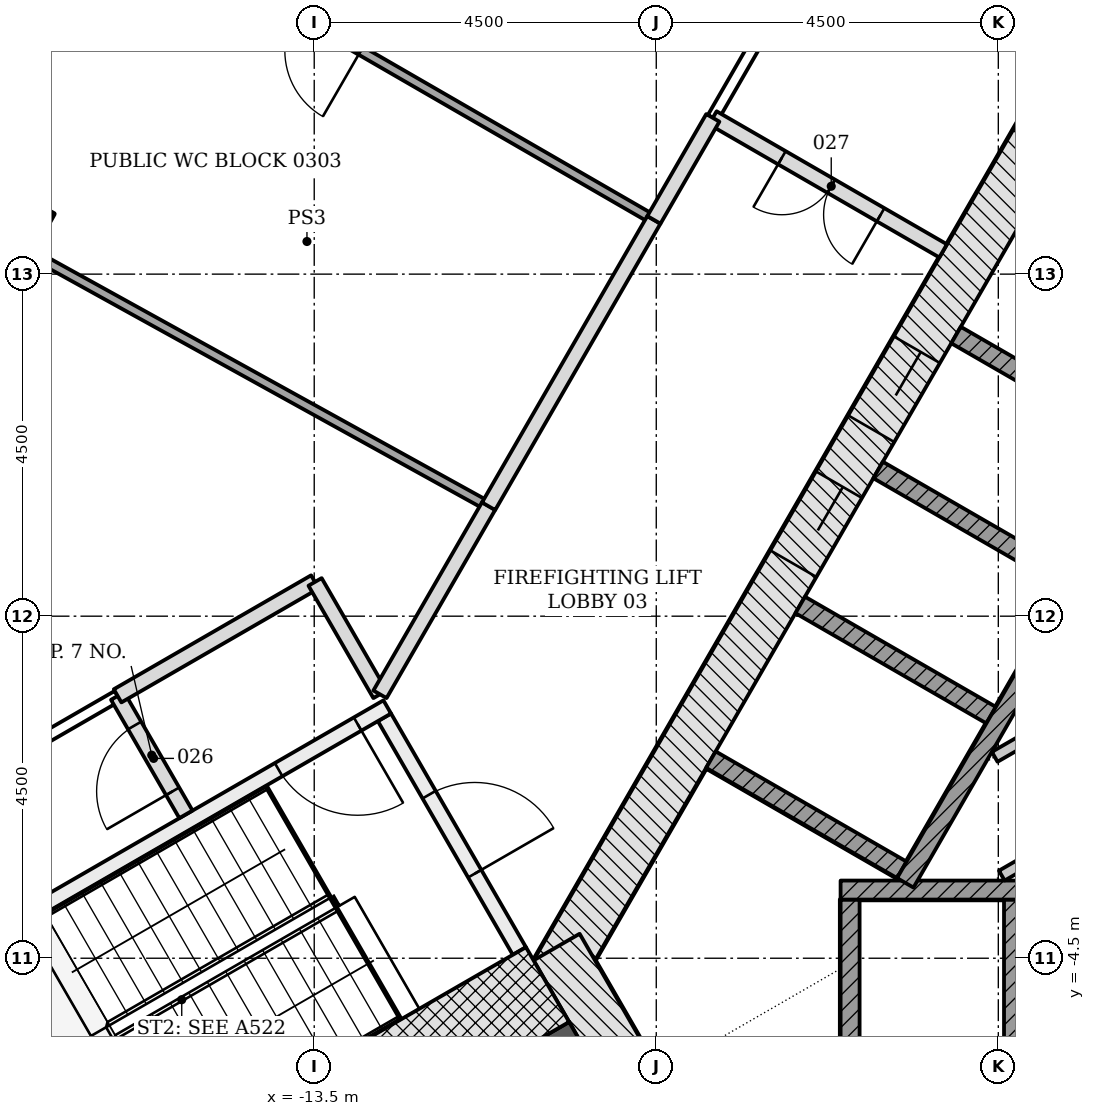
"""IFC4 building model, lengths in metres.
Left out: names, types, materials, properties, quantities, classifications, styles, units other than length and angle.
Written with IfcOpenShell. Run it as: python <this file> out.ifc"""

import sys

from ifc_helpers import new_model, si_unit, direction, frame, frame_2d, origin, origin_2d, place, context, subcontext, project, spatial, polyline, rectangle, outline, extrude, element, fill, save


model = new_model("IFC4")
c1 = context("Model", 3, precision=1e-05, world=origin(), true_north=direction((0.0, 1.0)))
c2 = subcontext(c1, "Body", "Model", "MODEL_VIEW")
j1 = project(units=[si_unit("LENGTHUNIT", "METRE"), si_unit("PLANEANGLEUNIT", "RADIAN")], contexts=[c1])
p1 = place(None, origin())
s1 = spatial("IfcSite", under=j1, at=p1, CompositionType="ELEMENT")
p2 = place(p1, origin())
s2 = spatial("IfcBuilding", under=s1, at=p2, CompositionType="ELEMENT")
p3 = place(p2, frame((0.0, 0.0, 15.0)))
s3 = spatial("IfcBuildingStorey", under=s2, at=p3, CompositionType="ELEMENT", Elevation=15.0)
p4 = place(p3, frame((-17.739, 5.058, -0.25), z_axis=(0.0, 0.0, 1.0), x_axis=(-0.875152760281, 0.483846717641, 0.0)))
e1 = element("IfcColumn", 1, at=p4, inside=s3, PredefinedType="COLUMN", context=c2, shape_type="SweptSolid", body=[
    extrude(rectangle(XDim=1.2, YDim=1.2, at=origin_2d()), origin(), (0.0, 0.0, 1.0), 4.5),
])
p5 = place(p3, frame((-1.083, 11.281, -0.25), z_axis=(0.0, 0.0, 1.0), x_axis=(-0.500001446645, -0.866024568562, 0.0)))
e2 = element("IfcWall", 2, at=p5, inside=s3, PredefinedType="SHEAR", context=c2, shape_type="SweptSolid", body=[
    extrude(rectangle(XDim=18.458, YDim=0.7, at=frame_2d((9.229, 0.0))), origin(), (0.0, 0.0, 1.0), 4.5),
])
p6 = place(p5, frame((8.979, 0.0, 0.25)))
e3 = element("IfcOpeningElement", 3, at=p6, cuts=e2, PredefinedType="OPENING", context=c2, shape_type="SweptSolid", body=[
    extrude(rectangle(XDim=1.2, YDim=2.1, at=frame_2d((0.6, 1.05))), frame((0.0, 0.36, 0.0), z_axis=(0.0, -1.0, 0.0), x_axis=(1.0, 0.0, 0.0)), (0.0, 0.0, 1.0), 0.72),
])
p7 = place(p5, frame((11.029, 0.0, 0.25)))
e4 = element("IfcOpeningElement", 4, at=p7, cuts=e2, PredefinedType="OPENING", context=c2, shape_type="SweptSolid", body=[
    extrude(rectangle(XDim=1.2, YDim=2.1, at=frame_2d((0.6, 1.05))), frame((0.0, 0.36, 0.0), z_axis=(0.0, -1.0, 0.0), x_axis=(1.0, 0.0, 0.0)), (0.0, 0.0, 1.0), 0.72),
])
p8 = place(p3, frame((-10.311, -4.353, -0.25), z_axis=(0.0, 0.0, 1.0), x_axis=(0.500042739161, -0.866000726912, 0.0)))
e5 = element("IfcWall", 5, at=p8, inside=s3, PredefinedType="SHEAR", context=c2, shape_type="SweptSolid", body=[
    extrude(rectangle(XDim=2.771, YDim=0.7, at=frame_2d((1.386, 0.0))), origin(), (0.0, 0.0, 1.0), 4.5),
])
p9 = place(p3, frame((-9.922, -5.728, -0.25), z_axis=(0.0, 0.0, 1.0), x_axis=(-0.866028046028, -0.499995423472, 0.0)))
e6 = element("IfcWall", 6, at=p9, inside=s3, PredefinedType="SHEAR", context=c2, shape_type="SweptSolid", body=[
    extrude(rectangle(XDim=14.633, YDim=0.9, at=frame_2d((7.316, 0.0))), origin(), (0.0, 0.0, 1.0), 4.5),
])
p10 = place(p9, frame((7.35, 0.0, 0.25)))
e7 = element("IfcOpeningElement", 7, at=p10, cuts=e6, PredefinedType="OPENING", context=c2, shape_type="SweptSolid", body=[
    extrude(rectangle(XDim=1.5, YDim=2.1, at=frame_2d((0.75, 1.05))), frame((0.0, 0.46, 0.0), z_axis=(0.0, -1.0, 0.0), x_axis=(1.0, 0.0, 0.0)), (0.0, 0.0, 1.0), 0.92),
])
for number, where, z_axis, x_axis in (
    (8, (-6.45, -6.228, -0.25), (0.0, 0.0, 1.0), (0.0, 1.0, 0.0)),
    (9, (-4.3, -6.228, -0.25), (0.0, 0.0, 1.0), (0.0, 1.0, 0.0)),
):
    element("IfcWall", number, at=place(p3, frame(where, z_axis=z_axis, x_axis=x_axis)), inside=s3, PredefinedType="PARTITIONING", context=c2, shape_type="SweptSolid", body=[
        extrude(rectangle(XDim=2.5, YDim=0.25, at=frame_2d((1.25, 0.0))), origin(), (0.0, 0.0, 1.0), 4.5),
    ])
p11 = place(p3, frame((-6.575, -3.603, 0.0), z_axis=(0.0, 0.0, 1.0), x_axis=(1.0, 0.0, 0.0)))
e10 = element("IfcWall", 10, at=p11, inside=s3, PredefinedType="PARTITIONING", context=c2, shape_type="SweptSolid", body=[
    extrude(rectangle(XDim=13.15, YDim=0.25, at=frame_2d((6.575, 0.0))), origin(), (0.0, 0.0, 1.0), 4.25),
])
for number, where, z_axis, x_axis in (
    (11, (-5.056, 3.699, -0.25), (0.0, 0.0, 1.0), (0.866, -0.5, 0.0)),
    (12, (-6.081, 1.923, -0.25), (0.0, 0.0, 1.0), (0.866, -0.5, 0.0)),
    (13, (-7.106, 0.148, -0.25), (0.0, 0.0, 1.0), (0.866, -0.5, 0.0)),
    (14, (-8.281, -1.887, -0.25), (0.0, 0.0, 1.0), (0.866, -0.5, 0.0)),
):
    element("IfcWall", number, at=place(p3, frame(where, z_axis=z_axis, x_axis=x_axis)), inside=s3, PredefinedType="PARTITIONING", context=c2, shape_type="SweptSolid", body=[
        extrude(rectangle(XDim=2.9, YDim=0.25, at=frame_2d((1.45, 0.0))), origin(), (0.0, 0.0, 1.0), 4.5),
    ])
p12 = place(p3, frame((0.176, 6.711, 0.0), z_axis=(0.0, 0.0, 1.0), x_axis=(-0.500004227369, -0.866022963098, 0.0)))
e15 = element("IfcWall", 15, at=p12, inside=s3, PredefinedType="PARTITIONING", context=c2, shape_type="SweptSolid", body=[
    extrude(rectangle(XDim=11.8, YDim=0.25, at=frame_2d((5.9, 0.0))), origin(), (0.0, 0.0, 1.0), 4.25),
])
p13 = place(p3, frame((-4.548, -1.851, 0.0), z_axis=(0.0, 0.0, 1.0), x_axis=(0.866023939251, 0.500002536638, 0.0)))
e16 = element("IfcWall", 16, at=p13, inside=s3, PredefinedType="PARTITIONING", context=c2, shape_type="SweptSolid", body=[
    extrude(rectangle(XDim=11.092, YDim=0.15, at=frame_2d((5.546, 0.0))), origin(), (0.0, 0.0, 1.0), 4.25),
])
p14 = place(p13, frame((3.497, 0.0, 0.0)))
e17 = element("IfcOpeningElement", 17, at=p14, cuts=e16, PredefinedType="OPENING", context=c2, shape_type="SweptSolid", body=[
    extrude(rectangle(XDim=0.9, YDim=2.1, at=frame_2d((0.45, 1.05))), frame((0.0, 0.085, 0.0), z_axis=(0.0, -1.0, 0.0), x_axis=(1.0, 0.0, 0.0)), (0.0, 0.0, 1.0), 0.17),
])
p15 = place(p3, frame((-4.454, -3.413, 0.0), z_axis=(0.0, 0.0, 1.0), x_axis=(0.86603043987, 0.499991277142, 0.0)))
e18 = element("IfcWall", 18, at=p15, inside=s3, PredefinedType="PARTITIONING", context=c2, shape_type="SweptSolid", body=[
    extrude(rectangle(XDim=11.792, YDim=0.15, at=frame_2d((5.896, 0.0))), origin(), (0.0, 0.0, 1.0), 4.25),
])
p16 = place(p15, frame((3.847, 0.0, 0.0)))
e19 = element("IfcOpeningElement", 19, at=p16, cuts=e18, PredefinedType="OPENING", context=c2, shape_type="SweptSolid", body=[
    extrude(rectangle(XDim=0.9, YDim=2.1, at=frame_2d((0.45, 1.05))), frame((0.0, 0.085, 0.0), z_axis=(0.0, -1.0, 0.0), x_axis=(1.0, 0.0, 0.0)), (0.0, 0.0, 1.0), 0.17),
])
p17 = place(p3, frame((-12.576, -1.331, -0.25), z_axis=(0.0, 0.0, 1.0), x_axis=(0.499970499736, -0.8660424351, 0.0)))
e20 = element("IfcWall", 20, at=p17, inside=s3, PredefinedType="SHEAR", context=c2, shape_type="SweptSolid", body=[
    extrude(rectangle(XDim=3.55, YDim=0.2, at=frame_2d((1.775, 0.0))), origin(), (0.0, 0.0, 1.0), 4.5),
])
p18 = place(p17, frame((1.175, 0.0, 0.25)))
e21 = element("IfcOpeningElement", 21, at=p18, cuts=e20, PredefinedType="OPENING", context=c2, shape_type="SweptSolid", body=[
    extrude(rectangle(XDim=1.2, YDim=2.1, at=frame_2d((0.6, 1.05))), frame((0.0, 0.11, 0.0), z_axis=(0.0, -1.0, 0.0), x_axis=(1.0, 0.0, 0.0)), (0.0, 0.0, 1.0), 0.22),
])
p19 = place(p3, frame((-12.539, -1.194, -0.25), z_axis=(0.0, 0.0, 1.0), x_axis=(-0.866045472092, -0.499965239061, 0.0)))
e22 = element("IfcWall", 22, at=p19, inside=s3, PredefinedType="SHEAR", context=c2, shape_type="SweptSolid", body=[
    extrude(rectangle(XDim=5.6, YDim=0.2, at=frame_2d((2.8, 0.0))), origin(), (0.0, 0.0, 1.0), 4.5),
])
p20 = place(p19, frame((0.45, 0.0, 0.25)))
e23 = element("IfcOpeningElement", 23, at=p20, cuts=e22, PredefinedType="OPENING", context=c2, shape_type="SweptSolid", body=[
    extrude(rectangle(XDim=1.2, YDim=2.1, at=frame_2d((0.6, 1.05))), frame((0.0, 0.11, 0.0), z_axis=(0.0, -1.0, 0.0), x_axis=(1.0, 0.0, 0.0)), (0.0, 0.0, 1.0), 0.22),
])
p21 = place(p3, frame((-10.43, -4.847, -0.25), z_axis=(0.0, 0.0, 1.0), x_axis=(-0.866018442252, -0.500012057535, 0.0)))
e24 = element("IfcWall", 24, at=p21, inside=s3, PredefinedType="SHEAR", context=c2, shape_type="SweptSolid", body=[
    extrude(rectangle(XDim=7.2, YDim=1.136, at=frame_2d((3.6, 0.0))), origin(), (0.0, 0.0, 1.0), 4.5),
])
p22 = place(p3, frame((0.0, 0.0, -0.25)))
e25 = element("IfcWall", 25, at=p22, inside=s3, PredefinedType="SHEAR", context=c2, shape_type="SweptSolid", body=[
    extrude(outline(polyline([(-17.439, -3.907), (-18.025, -6.093), (-16.95, -7.955), (-16.777, -7.855), (-17.81, -6.065), (-17.267, -4.039), (-17.339, -4.081), (-17.339, -4.081), (-17.339, -4.081), (-17.339, -4.081), (-17.339, -4.081), (-17.339, -4.081), (-17.339, -4.081), (-17.339, -4.081), (-17.339, -4.081), (-17.339, -4.081), (-17.339, -4.081), (-17.339, -4.081), (-17.339, -4.081), (-17.339, -4.081), (-17.339, -4.081), (-17.339, -4.081), (-17.339, -4.081), (-17.439, -3.907)])), origin(), (0.0, 0.0, 1.0), 4.5),
])
p23 = place(p3, frame((-16.088, -1.049, 0.0), z_axis=(0.0, 0.0, 1.0), x_axis=(-0.866023883975, -0.500002632377, 0.0)))
e26 = element("IfcWall", 26, at=p23, inside=s3, PredefinedType="PARTITIONING", context=c2, shape_type="SweptSolid", body=[
    extrude(rectangle(XDim=5.104, YDim=0.15, at=frame_2d((2.552, 0.0))), origin(), (0.0, 0.0, 1.0), 3.638),
])
p24 = place(p23, frame((1.65, 0.0, 0.0)))
e27 = element("IfcOpeningElement", 27, at=p24, cuts=e26, PredefinedType="OPENING", context=c2, shape_type="SweptSolid", body=[
    extrude(rectangle(XDim=1.8, YDim=2.1, at=frame_2d((0.9, 1.05))), frame((0.0, 0.085, 0.0), z_axis=(0.0, -1.0, 0.0), x_axis=(1.0, 0.0, 0.0)), (0.0, 0.0, 1.0), 0.17),
])
p25 = place(p3, frame((-15.188, -2.607, 0.0), z_axis=(0.0, 0.0, 1.0), x_axis=(-0.500024172624, 0.866011447264, 0.0)))
e28 = element("IfcWall", 28, at=p25, inside=s3, PredefinedType="PARTITIONING", context=c2, shape_type="SweptSolid", body=[
    extrude(rectangle(XDim=1.798, YDim=0.2, at=frame_2d((0.899, 0.0))), origin(), (0.0, 0.0, 1.0), 3.638),
])
p26 = place(p25, frame((0.35, 0.0, 0.0)))
e29 = element("IfcOpeningElement", 29, at=p26, cuts=e28, PredefinedType="OPENING", context=c2, shape_type="SweptSolid", body=[
    extrude(rectangle(XDim=1.0, YDim=2.1, at=frame_2d((0.5, 1.05))), frame((0.0, 0.11, 0.0), z_axis=(0.0, -1.0, 0.0), x_axis=(1.0, 0.0, 0.0)), (0.0, 0.0, 1.0), 0.22),
])
p27 = place(p3, frame((-16.087, -1.048, 0.0), z_axis=(0.0, 0.0, 1.0), x_axis=(0.865988915629, 0.500063194015, 0.0)))
e30 = element("IfcWall", 30, at=p27, inside=s3, PredefinedType="PARTITIONING", context=c2, shape_type="SweptSolid", body=[
    extrude(rectangle(XDim=2.998, YDim=0.2, at=frame_2d((1.499, 0.0))), origin(), (0.0, 0.0, 1.0), 3.638),
])
p28 = place(p3, frame((-13.489, 0.451, 0.0), z_axis=(0.0, 0.0, 1.0), x_axis=(0.500044178772, -0.865999895656, 0.0)))
e31 = element("IfcWall", 31, at=p28, inside=s3, PredefinedType="PARTITIONING", context=c2, shape_type="SweptSolid", body=[
    extrude(rectangle(XDim=1.708, YDim=0.2, at=frame_2d((0.854, 0.0))), origin(), (0.0, 0.0, 1.0), 4.25),
])
p29 = place(p3, frame((-12.635, -1.028, 0.0), z_axis=(0.0, 0.0, 1.0), x_axis=(0.499801250411, 0.866140121509, 0.0)))
e32 = element("IfcWall", 32, at=p29, inside=s3, PredefinedType="PARTITIONING", context=c2, shape_type="SweptSolid", body=[
    extrude(rectangle(XDim=2.861, YDim=0.2, at=frame_2d((1.431, 0.0))), origin(), (0.0, 0.0, 1.0), 3.638),
])
p30 = place(p3, frame((-11.208, 1.446, 0.0), z_axis=(0.0, 0.0, 1.0), x_axis=(-0.875125393946, 0.483896212912, 0.0)))
e33 = element("IfcWall", 33, at=p30, inside=s3, PredefinedType="PARTITIONING", context=c2, shape_type="SweptSolid", body=[
    extrude(rectangle(XDim=6.863, YDim=0.12, at=frame_2d((3.432, 0.0))), origin(), (0.0, 0.0, 1.0), 3.638),
])
p31 = place(p3, frame((-9.032, 5.213, 0.0), z_axis=(0.0, 0.0, 1.0), x_axis=(-0.499876332206, -0.866096791646, 0.0)))
e34 = element("IfcWall", 34, at=p31, inside=s3, PredefinedType="PARTITIONING", context=c2, shape_type="SweptSolid", body=[
    extrude(rectangle(XDim=4.349, YDim=0.2, at=frame_2d((2.175, 0.0))), origin(), (0.0, 0.0, 1.0), 3.638),
])
p32 = place(p3, frame((-5.226, 4.806, 0.0), z_axis=(0.0, 0.0, 1.0), x_axis=(-0.865949687125, 0.500131122175, 0.0)))
e35 = element("IfcWall", 35, at=p32, inside=s3, PredefinedType="PARTITIONING", context=c2, shape_type="SweptSolid", body=[
    extrude(rectangle(XDim=3.499, YDim=0.2, at=frame_2d((1.75, 0.0))), origin(), (0.0, 0.0, 1.0), 4.25),
])
p33 = place(p32, frame((0.95, 0.0, 0.0)))
e36 = element("IfcOpeningElement", 36, at=p33, cuts=e35, PredefinedType="OPENING", context=c2, shape_type="SweptSolid", body=[
    extrude(rectangle(XDim=1.5, YDim=2.1, at=frame_2d((0.75, 1.05))), frame((0.0, 0.11, 0.0), z_axis=(0.0, -1.0, 0.0), x_axis=(1.0, 0.0, 0.0)), (0.0, 0.0, 1.0), 0.22),
])
p34 = place(p3, frame((-8.256, 6.556, 0.0), z_axis=(0.0, 0.0, 1.0), x_axis=(-0.500104332946, -0.86596515875, 0.0)))
e37 = element("IfcWall", 37, at=p34, inside=s3, PredefinedType="PARTITIONING", context=c2, shape_type="SweptSolid", body=[
    extrude(rectangle(XDim=1.55, YDim=0.2, at=frame_2d((0.775, 0.0))), origin(), (0.0, 0.0, 1.0), 3.638),
])
p35 = place(p3, frame((-9.033, 5.214, 0.0), z_axis=(0.0, 0.0, 1.0), x_axis=(-0.866000641544, 0.500042887006, 0.0)))
e38 = element("IfcWall", 38, at=p35, inside=s3, PredefinedType="PARTITIONING", context=c2, shape_type="SweptSolid", body=[
    extrude(rectangle(XDim=9.827, YDim=0.12, at=frame_2d((4.914, 0.0))), origin(), (0.0, 0.0, 1.0), 3.638),
])
p36 = place(p35, frame((4.45, 0.0, 0.0)))
e39 = element("IfcOpeningElement", 39, at=p36, cuts=e38, PredefinedType="OPENING", context=c2, shape_type="SweptSolid", body=[
    extrude(rectangle(XDim=1.0, YDim=2.1, at=frame_2d((0.5, 1.05))), frame((0.0, 0.07, 0.0), z_axis=(0.0, -1.0, 0.0), x_axis=(1.0, 0.0, 0.0)), (0.0, 0.0, 1.0), 0.14),
])
p37 = place(p3, frame((-3.406, 14.956, 0.0), z_axis=(0.0, 0.0, 1.0), x_axis=(-0.500020940175, -0.866013313631, 0.0)))
e40 = element("IfcWall", 40, at=p37, inside=s3, PredefinedType="PARTITIONING", context=c2, shape_type="SweptSolid", body=[
    extrude(rectangle(XDim=9.7, YDim=0.15, at=frame_2d((4.85, 0.0))), origin(), (0.0, 0.0, 1.0), 3.638),
])
p38 = place(p37, frame((3.95, 0.0, 0.0)))
e41 = element("IfcOpeningElement", 41, at=p38, cuts=e40, PredefinedType="OPENING", context=c2, shape_type="SweptSolid", body=[
    extrude(rectangle(XDim=1.8, YDim=2.1, at=frame_2d((0.9, 1.05))), frame((0.0, 0.085, 0.0), z_axis=(0.0, -1.0, 0.0), x_axis=(1.0, 0.0, 0.0)), (0.0, 0.0, 1.0), 0.17),
])
p39 = place(p6, origin())
e42 = element("IfcDoor", 42, at=p39, inside=s3, OperationType="DOUBLE_DOOR_SLIDING", PredefinedType="DOOR", context=c2, shape_type="SweptSolid", body=[
    extrude(rectangle(XDim=1.2, YDim=2.1, at=frame_2d((0.6, 1.05))), frame((0.0, 0.025, 0.0), z_axis=(0.0, -1.0, 0.0), x_axis=(1.0, 0.0, 0.0)), (0.0, 0.0, 1.0), 0.05),
])
fill(e3, e42)
p40 = place(p7, origin())
e43 = element("IfcDoor", 43, at=p40, inside=s3, OperationType="DOUBLE_DOOR_SLIDING", PredefinedType="DOOR", context=c2, shape_type="SweptSolid", body=[
    extrude(rectangle(XDim=1.2, YDim=2.1, at=frame_2d((0.6, 1.05))), frame((0.0, 0.025, 0.0), z_axis=(0.0, -1.0, 0.0), x_axis=(1.0, 0.0, 0.0)), (0.0, 0.0, 1.0), 0.05),
])
fill(e4, e43)
p41 = place(p18, origin())
e44 = element("IfcDoor", 44, at=p41, inside=s3, OperationType="SINGLE_SWING_RIGHT", PredefinedType="DOOR", context=c2, shape_type="SweptSolid", body=[
    extrude(rectangle(XDim=1.2, YDim=2.1, at=frame_2d((0.6, 1.05))), frame((0.0, 0.025, 0.0), z_axis=(0.0, -1.0, 0.0), x_axis=(1.0, 0.0, 0.0)), (0.0, 0.0, 1.0), 0.05),
])
fill(e21, e44)
p42 = place(p20, origin())
e45 = element("IfcDoor", 45, at=p42, inside=s3, OperationType="SINGLE_SWING_LEFT", PredefinedType="DOOR", context=c2, shape_type="SweptSolid", body=[
    extrude(rectangle(XDim=1.2, YDim=2.1, at=frame_2d((0.6, 1.05))), frame((0.0, 0.025, 0.0), z_axis=(0.0, -1.0, 0.0), x_axis=(1.0, 0.0, 0.0)), (0.0, 0.0, 1.0), 0.05),
])
fill(e23, e45)
p43 = place(p36, origin())
e46 = element("IfcDoor", 46, at=p43, inside=s3, OperationType="SINGLE_SWING_RIGHT", PredefinedType="DOOR", context=c2, shape_type="SweptSolid", body=[
    extrude(rectangle(XDim=1.0, YDim=2.1, at=frame_2d((0.5, 1.05))), frame((0.0, 0.025, 0.0), z_axis=(0.0, -1.0, 0.0), x_axis=(1.0, 0.0, 0.0)), (0.0, 0.0, 1.0), 0.05),
])
fill(e39, e46)
p44 = place(p26, origin())
e47 = element("IfcDoor", 47, at=p44, inside=s3, OperationType="SINGLE_SWING_LEFT", PredefinedType="DOOR", context=c2, shape_type="SweptSolid", body=[
    extrude(rectangle(XDim=1.0, YDim=2.1, at=frame_2d((0.5, 1.05))), frame((0.0, 0.025, 0.0), z_axis=(0.0, -1.0, 0.0), x_axis=(1.0, 0.0, 0.0)), (0.0, 0.0, 1.0), 0.05),
])
fill(e29, e47)
p45 = place(p33, origin())
e48 = element("IfcDoor", 48, at=p45, inside=s3, OperationType="DOUBLE_DOOR_SINGLE_SWING", PredefinedType="DOOR", context=c2, shape_type="SweptSolid", body=[
    extrude(rectangle(XDim=1.5, YDim=2.1, at=frame_2d((0.75, 1.05))), frame((0.0, 0.025, 0.0), z_axis=(0.0, -1.0, 0.0), x_axis=(1.0, 0.0, 0.0)), (0.0, 0.0, 1.0), 0.05),
])
fill(e36, e48)
save(model, sys.argv[1])
